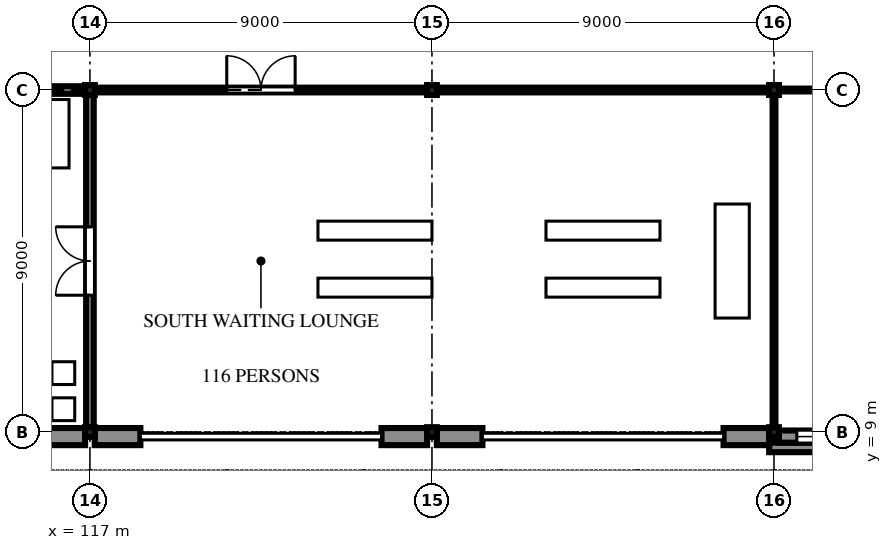
"""IFC4 building model, lengths in metres.
Left out: names, types, materials, properties, quantities, classifications, styles, units other than length and angle.
Written with IfcOpenShell. Run it as: python <this file> out.ifc"""

import sys

from ifc_helpers import new_model, si_unit, direction, frame, frame_2d, origin, origin_2d, place, context, subcontext, project, spatial, polyline, rectangle, i_section, outline, extrude, element, fill, save


model = new_model("IFC4")
c1 = context("Model", 3, precision=1e-05, world=origin(), true_north=direction((0.0, 1.0)))
c2 = subcontext(c1, "Body", "Model", "MODEL_VIEW")
j1 = project(units=[si_unit("LENGTHUNIT", "METRE"), si_unit("PLANEANGLEUNIT", "RADIAN")], contexts=[c1])
p1 = place(None, origin())
s1 = spatial("IfcSite", under=j1, at=p1, CompositionType="ELEMENT")
p2 = place(p1, origin())
s2 = spatial("IfcBuilding", under=s1, at=p2, CompositionType="ELEMENT")
p3 = place(p2, origin())
s3 = spatial("IfcBuildingStorey", under=s2, at=p3, CompositionType="ELEMENT", Elevation=0.0)
p4 = place(p3, frame((117.0, 9.0, -2.1), z_axis=(0.0, 0.0, 1.0), x_axis=(1.0, 0.0, 0.0)))
e1 = element("IfcColumn", 1, at=p4, inside=s3, PredefinedType="COLUMN", context=c2, shape_type="SweptSolid", body=[
    extrude(i_section(OverallWidth=0.255, OverallDepth=0.254, WebThickness=0.009, FlangeThickness=0.014, FilletRadius=0.013, at=origin_2d()), origin(), (0.0, 0.0, 1.0), 9.6),
])
p5 = place(p3, frame((117.0, 18.0, -2.1), z_axis=(0.0, 0.0, 1.0), x_axis=(1.0, 0.0, 0.0)))
e2 = element("IfcColumn", 2, at=p5, inside=s3, PredefinedType="COLUMN", context=c2, shape_type="SweptSolid", body=[
    extrude(i_section(OverallWidth=0.256, OverallDepth=0.26, WebThickness=0.01, FlangeThickness=0.017, FilletRadius=0.013, at=origin_2d()), origin(), (0.0, 0.0, 1.0), 9.6),
])
p6 = place(p3, frame((126.0, 9.0, -2.1), z_axis=(0.0, 0.0, 1.0), x_axis=(1.0, 0.0, 0.0)))
e3 = element("IfcColumn", 3, at=p6, inside=s3, PredefinedType="COLUMN", context=c2, shape_type="SweptSolid", body=[
    extrude(i_section(OverallWidth=0.255, OverallDepth=0.254, WebThickness=0.009, FlangeThickness=0.014, FilletRadius=0.013, at=origin_2d()), origin(), (0.0, 0.0, 1.0), 9.6),
])
p7 = place(p3, frame((126.0, 18.0, -2.1), z_axis=(0.0, 0.0, 1.0), x_axis=(1.0, 0.0, 0.0)))
e4 = element("IfcColumn", 4, at=p7, inside=s3, PredefinedType="COLUMN", context=c2, shape_type="SweptSolid", body=[
    extrude(i_section(OverallWidth=0.256, OverallDepth=0.26, WebThickness=0.01, FlangeThickness=0.017, FilletRadius=0.013, at=origin_2d()), origin(), (0.0, 0.0, 1.0), 9.6),
])
p8 = place(p3, frame((135.0, 9.0, -2.1), z_axis=(0.0, 0.0, 1.0), x_axis=(1.0, 0.0, 0.0)))
e5 = element("IfcColumn", 5, at=p8, inside=s3, PredefinedType="COLUMN", context=c2, shape_type="SweptSolid", body=[
    extrude(i_section(OverallWidth=0.255, OverallDepth=0.254, WebThickness=0.009, FlangeThickness=0.014, FilletRadius=0.013, at=origin_2d()), origin(), (0.0, 0.0, 1.0), 9.6),
])
p9 = place(p3, frame((135.0, 18.0, -2.1), z_axis=(0.0, 0.0, 1.0), x_axis=(1.0, 0.0, 0.0)))
e6 = element("IfcColumn", 6, at=p9, inside=s3, PredefinedType="COLUMN", context=c2, shape_type="SweptSolid", body=[
    extrude(i_section(OverallWidth=0.256, OverallDepth=0.26, WebThickness=0.01, FlangeThickness=0.017, FilletRadius=0.013, at=origin_2d()), origin(), (0.0, 0.0, 1.0), 9.6),
])
p10 = place(p3, frame((115.5, 8.88, 0.0), z_axis=(0.0, 0.0, 1.0), x_axis=(1.0, 0.0, 0.0)))
e7 = element("IfcWall", 7, at=p10, inside=s3, PredefinedType="SOLIDWALL", context=c2, shape_type="SweptSolid", body=[
    extrude(rectangle(XDim=1.373, YDim=0.45, at=frame_2d((0.687, 0.0))), origin(), (0.0, 0.0, 1.0), 6.767),
])
for number, where, z_axis, x_axis in (
    (8, (117.127, 8.88, 0.0), (0.0, 0.0, 1.0), (1.0, 0.0, 0.0)),
    (9, (124.673, 8.88, 0.0), (0.0, 0.0, 1.0), (1.0, 0.0, 0.0)),
    (10, (126.127, 8.88, 0.0), (0.0, 0.0, 1.0), (1.0, 0.0, 0.0)),
    (11, (133.673, 8.88, 0.0), (0.0, 0.0, 1.0), (1.0, 0.0, 0.0)),
):
    element("IfcWall", number, at=place(p3, frame(where, z_axis=z_axis, x_axis=x_axis)), inside=s3, PredefinedType="SOLIDWALL", context=c2, shape_type="SweptSolid", body=[
        extrude(rectangle(XDim=1.2, YDim=0.45, at=frame_2d((0.6, 0.0))), origin(), (0.0, 0.0, 1.0), 6.767),
    ])
p11 = place(p3, frame((135.127, 8.88, 0.0), z_axis=(0.0, 0.0, 1.0), x_axis=(1.0, 0.0, 0.0)))
e12 = element("IfcWall", 12, at=p11, inside=s3, PredefinedType="SOLIDWALL", context=c2, shape_type="SweptSolid", body=[
    extrude(rectangle(XDim=8.746, YDim=0.32, at=frame_2d((4.373, 0.0))), origin(), (0.0, 0.0, 1.0), 6.767),
])
p12 = place(p11, frame((3.473, 0.0, 0.0)))
e13 = element("IfcOpeningElement", 13, at=p12, cuts=e12, PredefinedType="OPENING", context=c2, shape_type="SweptSolid", body=[
    extrude(rectangle(XDim=1.8, YDim=2.1, at=frame_2d((0.9, 1.05))), frame((0.0, 0.17, 0.0), z_axis=(0.0, -1.0, 0.0), x_axis=(1.0, 0.0, 0.0)), (0.0, 0.0, 1.0), 0.34),
])
p13 = place(p11, frame((3.773, 0.0, 2.55)))
e14 = element("IfcOpeningElement", 14, at=p13, cuts=e12, PredefinedType="OPENING", context=c2, shape_type="SweptSolid", body=[
    extrude(rectangle(XDim=1.2, YDim=0.6, at=frame_2d((0.6, 0.3))), frame((0.0, 0.17, 0.0), z_axis=(0.0, -1.0, 0.0), x_axis=(1.0, 0.0, 0.0)), (0.0, 0.0, 1.0), 0.34),
])
p14 = place(p11, frame((0.473, 0.0, 0.9)))
e15 = element("IfcOpeningElement", 15, at=p14, cuts=e12, PredefinedType="OPENING", context=c2, shape_type="SweptSolid", body=[
    extrude(rectangle(XDim=1.8, YDim=3.6, at=frame_2d((0.9, 1.8))), frame((0.0, 0.17, 0.0), z_axis=(0.0, -1.0, 0.0), x_axis=(1.0, 0.0, 0.0)), (0.0, 0.0, 1.0), 0.34),
])
p15 = place(p11, frame((6.473, 0.0, 0.9)))
e16 = element("IfcOpeningElement", 16, at=p15, cuts=e12, PredefinedType="OPENING", context=c2, shape_type="SweptSolid", body=[
    extrude(rectangle(XDim=1.8, YDim=3.6, at=frame_2d((0.9, 1.8))), frame((0.0, 0.17, 0.0), z_axis=(0.0, -1.0, 0.0), x_axis=(1.0, 0.0, 0.0)), (0.0, 0.0, 1.0), 0.34),
])
p16 = place(p3, frame((134.873, 8.595, 0.0), z_axis=(0.0, 0.0, 1.0), x_axis=(1.0, 0.0, 0.0)))
e17 = element("IfcWall", 17, at=p16, inside=s3, PredefinedType="SOLIDWALL", context=c2, shape_type="SweptSolid", body=[
    extrude(outline(polyline([(0.0, 0.0), (3.577, 0.0), (3.577, 6.767), (0.0, 6.767), (0.0, 0.0)]), holes=[polyline([(0.577, 0.75), (0.577, 4.5), (0.619, 4.752), (0.787, 4.968), (0.934, 5.022), (1.06, 5.166), (1.333, 5.31), (1.627, 5.4), (1.921, 5.31), (2.194, 5.166), (2.32, 5.022), (2.467, 4.968), (2.635, 4.752), (2.677, 4.5), (2.677, 0.75), (0.577, 0.75)])]), frame((0.0, 0.125, 0.0), z_axis=(0.0, -1.0, 0.0), x_axis=(1.0, 0.0, 0.0)), (0.0, 0.0, 1.0), 0.25),
])
p17 = place(p3, frame((143.872, 18.0, 0.0), z_axis=(0.0, 0.0, 1.0), x_axis=(-1.0, 0.0, 0.0)))
e18 = element("IfcWall", 18, at=p17, inside=s3, PredefinedType="PARTITIONING", context=c2, shape_type="SweptSolid", body=[
    extrude(rectangle(XDim=8.744, YDim=0.075, at=frame_2d((4.372, 0.0))), origin(), (0.0, 0.0, 1.0), 6.692),
])
p18 = place(p17, frame((3.872, 0.0, 0.0)))
e19 = element("IfcOpeningElement", 19, at=p18, cuts=e18, PredefinedType="OPENING", context=c2, shape_type="SweptSolid", body=[
    extrude(rectangle(XDim=1.0, YDim=2.1, at=frame_2d((0.5, 1.05))), frame((0.0, 0.047, 0.0), z_axis=(0.0, -1.0, 0.0), x_axis=(1.0, 0.0, 0.0)), (0.0, 0.0, 1.0), 0.095),
])
p19 = place(p3, frame((134.872, 18.0, 0.0), z_axis=(0.0, 0.0, 1.0), x_axis=(-1.0, 0.0, 0.0)))
e20 = element("IfcWall", 20, at=p19, inside=s3, PredefinedType="PARTITIONING", context=c2, shape_type="SweptSolid", body=[
    extrude(rectangle(XDim=8.744, YDim=0.125, at=frame_2d((4.372, 0.0))), origin(), (0.0, 0.0, 1.0), 6.757),
])
p20 = place(p3, frame((125.872, 18.0, 0.0), z_axis=(0.0, 0.0, 1.0), x_axis=(-1.0, 0.0, 0.0)))
e21 = element("IfcWall", 21, at=p20, inside=s3, PredefinedType="PARTITIONING", context=c2, shape_type="SweptSolid", body=[
    extrude(rectangle(XDim=8.744, YDim=0.125, at=frame_2d((4.372, 0.0))), origin(), (0.0, 0.0, 1.0), 6.757),
])
p21 = place(p20, frame((3.472, 0.0, 0.0)))
e22 = element("IfcOpeningElement", 22, at=p21, cuts=e21, PredefinedType="OPENING", context=c2, shape_type="SweptSolid", body=[
    extrude(rectangle(XDim=1.8, YDim=2.4, at=frame_2d((0.9, 1.2))), frame((0.0, 0.073, 0.0), z_axis=(0.0, -1.0, 0.0), x_axis=(1.0, 0.0, 0.0)), (0.0, 0.0, 1.0), 0.145),
])
p22 = place(p3, frame((116.872, 18.0, 0.0), z_axis=(0.0, 0.0, 1.0), x_axis=(-1.0, 0.0, 0.0)))
e23 = element("IfcWall", 23, at=p22, inside=s3, PredefinedType="PARTITIONING", context=c2, shape_type="SweptSolid", body=[
    extrude(rectangle(XDim=8.744, YDim=0.2, at=frame_2d((4.372, 0.0))), origin(), (0.0, 0.0, 1.0), 6.6),
])
p23 = place(p22, frame((3.472, 0.0, 0.0)))
e24 = element("IfcOpeningElement", 24, at=p23, cuts=e23, PredefinedType="OPENING", context=c2, shape_type="SweptSolid", body=[
    extrude(rectangle(XDim=1.8, YDim=2.4, at=frame_2d((0.9, 1.2))), frame((0.0, 0.11, 0.0), z_axis=(0.0, -1.0, 0.0), x_axis=(1.0, 0.0, 0.0)), (0.0, 0.0, 1.0), 0.22),
])
p24 = place(p3, frame((117.0, 17.87, 0.0), z_axis=(0.0, 0.0, 1.0), x_axis=(0.0, -1.0, 0.0)))
e25 = element("IfcWall", 25, at=p24, inside=s3, PredefinedType="PARTITIONING", context=c2, shape_type="SweptSolid", body=[
    extrude(rectangle(XDim=8.743, YDim=0.2, at=frame_2d((4.372, 0.0))), origin(), (0.0, 0.0, 1.0), 6.6),
])
p25 = place(p24, frame((3.47, 0.0, 0.0)))
e26 = element("IfcOpeningElement", 26, at=p25, cuts=e25, PredefinedType="OPENING", context=c2, shape_type="SweptSolid", body=[
    extrude(rectangle(XDim=1.8, YDim=2.4, at=frame_2d((0.9, 1.2))), frame((0.0, 0.11, 0.0), z_axis=(0.0, -1.0, 0.0), x_axis=(1.0, 0.0, 0.0)), (0.0, 0.0, 1.0), 0.22),
])
p26 = place(p3, frame((135.0, 17.87, 0.0), z_axis=(0.0, 0.0, 1.0), x_axis=(0.0, -1.0, 0.0)))
e27 = element("IfcWall", 27, at=p26, inside=s3, PredefinedType="PARTITIONING", context=c2, shape_type="SweptSolid", body=[
    extrude(rectangle(XDim=8.743, YDim=0.075, at=frame_2d((4.372, 0.0))), origin(), (0.0, 0.0, 1.0), 6.692),
])
p27 = place(p14, origin())
e28 = element("IfcWindow", 28, at=p27, inside=s3, PartitioningType="TRIPLE_PANEL_HORIZONTAL", PredefinedType="WINDOW", context=c2, shape_type="SweptSolid", body=[
    extrude(outline(polyline([(0.0, 0.0), (1.8, 0.0), (1.8, 2.54), (1.793, 2.666), (1.771, 2.79), (1.734, 2.91), (1.684, 3.026), (1.62, 3.135), (1.545, 3.235), (1.458, 3.326), (1.361, 3.407), (1.255, 3.475), (1.142, 3.531), (1.023, 3.573), (0.9, 3.6), (0.777, 3.573), (0.658, 3.531), (0.545, 3.475), (0.439, 3.407), (0.342, 3.326), (0.255, 3.235), (0.18, 3.135), (0.116, 3.026), (0.066, 2.91), (0.03, 2.79), (0.007, 2.666), (0.0, 2.54), (0.0, 0.0)]), holes=[polyline([(0.07, 0.07), (1.73, 0.07), (1.73, 2.54), (1.723, 2.657), (1.703, 2.772), (1.669, 2.884), (1.623, 2.991), (1.565, 3.092), (1.495, 3.186), (1.415, 3.271), (1.325, 3.346), (1.228, 3.41), (1.124, 3.463), (1.014, 3.503), (0.9, 3.53), (0.786, 3.503), (0.677, 3.463), (0.572, 3.41), (0.475, 3.346), (0.385, 3.271), (0.305, 3.186), (0.235, 3.092), (0.177, 2.991), (0.131, 2.884), (0.097, 2.772), (0.077, 2.657), (0.07, 2.54), (0.07, 0.07)])]), frame((0.0, 0.03, 0.0), z_axis=(0.0, -1.0, 0.0), x_axis=(1.0, 0.0, 0.0)), (0.0, 0.0, 1.0), 0.06),
    extrude(outline(polyline([(0.0, 2.54), (0.007, 2.666), (0.03, 2.79), (0.066, 2.91), (0.116, 3.026), (0.18, 3.135), (0.255, 3.235), (0.342, 3.326), (0.439, 3.407), (0.545, 3.475), (0.658, 3.531), (0.777, 3.573), (0.9, 3.6), (0.0, 3.6), (0.0, 2.54)])), frame((0.0, 0.028, 0.0), z_axis=(0.0, -1.0, 0.0), x_axis=(1.0, 0.0, 0.0)), (0.0, 0.0, 1.0), 0.056),
    extrude(outline(polyline([(0.9, 3.6), (1.023, 3.573), (1.142, 3.531), (1.255, 3.475), (1.361, 3.407), (1.458, 3.326), (1.545, 3.235), (1.62, 3.135), (1.684, 3.026), (1.734, 2.91), (1.771, 2.79), (1.793, 2.666), (1.8, 2.54), (1.8, 3.6), (0.9, 3.6)])), frame((0.0, 0.027, 0.0), z_axis=(0.0, -1.0, 0.0), x_axis=(1.0, 0.0, 0.0)), (0.0, 0.0, 1.0), 0.054),
    extrude(outline(polyline([(1.728, 2.58), (0.073, 2.58), (0.07, 2.54), (0.07, 2.5), (1.73, 2.5), (1.73, 2.54), (1.728, 2.58)])), frame((0.0, 0.021, 0.0), z_axis=(0.0, -1.0, 0.0), x_axis=(1.0, 0.0, 0.0)), (0.0, 0.0, 1.0), 0.042),
    extrude(rectangle(XDim=1.66, YDim=0.04, at=frame_2d((0.9, 0.873))), frame((0.0, 0.021, 0.0), z_axis=(0.0, -1.0, 0.0), x_axis=(1.0, 0.0, 0.0)), (0.0, 0.0, 1.0), 0.043),
    extrude(rectangle(XDim=1.66, YDim=0.04, at=frame_2d((0.9, 1.697))), frame((0.0, 0.021, 0.0), z_axis=(0.0, -1.0, 0.0), x_axis=(1.0, 0.0, 0.0)), (0.0, 0.0, 1.0), 0.043),
    extrude(outline(polyline([(0.07, 0.07), (1.73, 0.07), (1.73, 0.853), (0.07, 0.853), (0.07, 0.07)]), holes=[polyline([(0.1, 0.1), (1.7, 0.1), (1.7, 0.823), (0.1, 0.823), (0.1, 0.1)])]), frame((0.0, 0.022, 0.0), z_axis=(0.0, -1.0, 0.0), x_axis=(1.0, 0.0, 0.0)), (0.0, 0.0, 1.0), 0.045),
    extrude(rectangle(XDim=1.6, YDim=0.723, at=frame_2d((0.9, 0.462))), frame((0.0, 0.006, 0.0), z_axis=(0.0, -1.0, 0.0), x_axis=(1.0, 0.0, 0.0)), (0.0, 0.0, 1.0), 0.012),
    extrude(outline(polyline([(0.07, 0.893), (1.73, 0.893), (1.73, 1.677), (0.07, 1.677), (0.07, 0.893)]), holes=[polyline([(0.1, 0.923), (1.7, 0.923), (1.7, 1.647), (0.1, 1.647), (0.1, 0.923)])]), frame((0.0, 0.022, 0.0), z_axis=(0.0, -1.0, 0.0), x_axis=(1.0, 0.0, 0.0)), (0.0, 0.0, 1.0), 0.045),
    extrude(rectangle(XDim=1.6, YDim=0.723, at=frame_2d((0.9, 1.285))), frame((0.0, 0.006, 0.0), z_axis=(0.0, -1.0, 0.0), x_axis=(1.0, 0.0, 0.0)), (0.0, 0.0, 1.0), 0.012),
    extrude(outline(polyline([(0.07, 1.717), (1.73, 1.717), (1.73, 2.5), (0.07, 2.5), (0.07, 1.717)]), holes=[polyline([(0.1, 1.747), (1.7, 1.747), (1.7, 2.47), (0.1, 2.47), (0.1, 1.747)])]), frame((0.0, 0.022, 0.0), z_axis=(0.0, -1.0, 0.0), x_axis=(1.0, 0.0, 0.0)), (0.0, 0.0, 1.0), 0.045),
    extrude(rectangle(XDim=1.6, YDim=0.723, at=frame_2d((0.9, 2.108))), frame((0.0, 0.006, 0.0), z_axis=(0.0, -1.0, 0.0), x_axis=(1.0, 0.0, 0.0)), (0.0, 0.0, 1.0), 0.012),
    extrude(outline(polyline([(0.073, 2.58), (1.728, 2.58), (1.723, 2.657), (1.703, 2.772), (1.669, 2.884), (1.623, 2.991), (1.565, 3.092), (1.495, 3.186), (1.415, 3.271), (1.325, 3.346), (1.228, 3.41), (1.124, 3.463), (1.014, 3.503), (0.9, 3.53), (0.786, 3.503), (0.677, 3.463), (0.572, 3.41), (0.475, 3.346), (0.385, 3.271), (0.305, 3.186), (0.235, 3.092), (0.177, 2.991), (0.131, 2.884), (0.097, 2.772), (0.077, 2.657), (0.073, 2.58)]), holes=[polyline([(0.112, 2.653), (0.131, 2.764), (0.164, 2.872), (0.208, 2.975), (0.265, 3.073), (0.332, 3.164), (0.409, 3.246), (0.496, 3.318), (0.59, 3.38), (0.69, 3.431), (0.796, 3.469), (0.9, 3.494), (1.004, 3.469), (1.11, 3.431), (1.21, 3.38), (1.304, 3.318), (1.391, 3.246), (1.468, 3.164), (1.535, 3.073), (1.592, 2.975), (1.636, 2.872), (1.669, 2.764), (1.688, 2.653), (1.69, 2.615), (0.11, 2.615), (0.112, 2.653)])]), frame((0.0, 0.022, 0.0), z_axis=(0.0, -1.0, 0.0), x_axis=(1.0, 0.0, 0.0)), (0.0, 0.0, 1.0), 0.045),
    extrude(outline(polyline([(0.11, 2.615), (1.69, 2.615), (1.688, 2.653), (1.669, 2.764), (1.636, 2.872), (1.592, 2.975), (1.535, 3.073), (1.468, 3.164), (1.391, 3.246), (1.304, 3.318), (1.21, 3.38), (1.11, 3.431), (1.004, 3.469), (0.9, 3.494), (0.796, 3.469), (0.69, 3.431), (0.59, 3.38), (0.496, 3.318), (0.409, 3.246), (0.332, 3.164), (0.265, 3.073), (0.208, 2.975), (0.164, 2.872), (0.131, 2.764), (0.112, 2.653), (0.11, 2.615)])), frame((0.0, 0.006, 0.0), z_axis=(0.0, -1.0, 0.0), x_axis=(1.0, 0.0, 0.0)), (0.0, 0.0, 1.0), 0.012),
])
fill(e15, e28)
p28 = place(p25, frame((1.8, 0.0, 0.0), z_axis=(0.0, 0.0, 1.0), x_axis=(-1.0, 0.0, 0.0)))
e29 = element("IfcDoor", 29, at=p28, inside=s3, OperationType="DOUBLE_DOOR_SINGLE_SWING", PredefinedType="DOOR", context=c2, shape_type="SweptSolid", body=[
    extrude(outline(polyline([(0.0, 0.0), (0.07, 0.0), (0.07, 2.33), (1.73, 2.33), (1.73, 0.0), (1.8, 0.0), (1.8, 2.4), (0.0, 2.4), (0.0, 0.0)])), frame((0.0, 0.025, 0.0), z_axis=(0.0, -1.0, 0.0), x_axis=(1.0, 0.0, 0.0)), (0.0, 0.0, 1.0), 0.05),
    extrude(outline(polyline([(0.074, 0.01), (0.897, 0.01), (0.897, 2.326), (0.074, 2.326), (0.074, 0.01)]), holes=[polyline([(0.194, 0.16), (0.777, 0.16), (0.777, 1.01), (0.194, 1.01), (0.194, 0.16)]), polyline([(0.335, 1.16), (0.635, 1.16), (0.635, 1.76), (0.335, 1.76), (0.335, 1.16)])]), frame((0.0, 0.017, 0.0), z_axis=(0.0, -1.0, 0.0), x_axis=(1.0, 0.0, 0.0)), (0.0, 0.0, 1.0), 0.035),
    extrude(rectangle(XDim=0.583, YDim=0.85, at=frame_2d((0.485, 0.585))), frame((0.0, 0.009, 0.0), z_axis=(0.0, -1.0, 0.0), x_axis=(1.0, 0.0, 0.0)), (0.0, 0.0, 1.0), 0.017),
    extrude(rectangle(XDim=0.3, YDim=0.6, at=frame_2d((0.485, 1.46))), frame((0.0, 0.006, 0.0), z_axis=(0.0, -1.0, 0.0), x_axis=(1.0, 0.0, 0.0)), (0.0, 0.0, 1.0), 0.012),
    extrude(outline(polyline([(0.903, 0.01), (1.726, 0.01), (1.726, 2.326), (0.903, 2.326), (0.903, 0.01)]), holes=[polyline([(1.023, 0.16), (1.606, 0.16), (1.606, 1.01), (1.023, 1.01), (1.023, 0.16)]), polyline([(1.165, 1.16), (1.465, 1.16), (1.465, 1.76), (1.165, 1.76), (1.165, 1.16)])]), frame((0.0, 0.017, 0.0), z_axis=(0.0, -1.0, 0.0), x_axis=(1.0, 0.0, 0.0)), (0.0, 0.0, 1.0), 0.035),
    extrude(rectangle(XDim=0.583, YDim=0.85, at=frame_2d((1.314, 0.585))), frame((0.0, 0.009, 0.0), z_axis=(0.0, -1.0, 0.0), x_axis=(1.0, 0.0, 0.0)), (0.0, 0.0, 1.0), 0.017),
    extrude(rectangle(XDim=0.3, YDim=0.6, at=frame_2d((1.314, 1.46))), frame((0.0, 0.006, 0.0), z_axis=(0.0, -1.0, 0.0), x_axis=(1.0, 0.0, 0.0)), (0.0, 0.0, 1.0), 0.012),
])
fill(e26, e29)
p29 = place(p21, frame((1.8, 0.0, 0.0), z_axis=(0.0, 0.0, 1.0), x_axis=(-1.0, 0.0, 0.0)))
e30 = element("IfcDoor", 30, at=p29, inside=s3, OperationType="DOUBLE_DOOR_SINGLE_SWING", PredefinedType="DOOR", context=c2, shape_type="SweptSolid", body=[
    extrude(outline(polyline([(0.0, 0.0), (0.07, 0.0), (0.07, 2.33), (1.73, 2.33), (1.73, 0.0), (1.8, 0.0), (1.8, 2.4), (0.0, 2.4), (0.0, 0.0)])), frame((0.0, 0.025, 0.0), z_axis=(0.0, -1.0, 0.0), x_axis=(1.0, 0.0, 0.0)), (0.0, 0.0, 1.0), 0.05),
    extrude(outline(polyline([(0.074, 0.01), (0.897, 0.01), (0.897, 2.326), (0.074, 2.326), (0.074, 0.01)]), holes=[polyline([(0.194, 0.16), (0.777, 0.16), (0.777, 1.01), (0.194, 1.01), (0.194, 0.16)]), polyline([(0.335, 1.16), (0.635, 1.16), (0.635, 1.76), (0.335, 1.76), (0.335, 1.16)])]), frame((0.0, 0.017, 0.0), z_axis=(0.0, -1.0, 0.0), x_axis=(1.0, 0.0, 0.0)), (0.0, 0.0, 1.0), 0.035),
    extrude(rectangle(XDim=0.583, YDim=0.85, at=frame_2d((0.485, 0.585))), frame((0.0, 0.009, 0.0), z_axis=(0.0, -1.0, 0.0), x_axis=(1.0, 0.0, 0.0)), (0.0, 0.0, 1.0), 0.017),
    extrude(rectangle(XDim=0.3, YDim=0.6, at=frame_2d((0.485, 1.46))), frame((0.0, 0.006, 0.0), z_axis=(0.0, -1.0, 0.0), x_axis=(1.0, 0.0, 0.0)), (0.0, 0.0, 1.0), 0.012),
    extrude(outline(polyline([(0.903, 0.01), (1.726, 0.01), (1.726, 2.326), (0.903, 2.326), (0.903, 0.01)]), holes=[polyline([(1.023, 0.16), (1.606, 0.16), (1.606, 1.01), (1.023, 1.01), (1.023, 0.16)]), polyline([(1.165, 1.16), (1.465, 1.16), (1.465, 1.76), (1.165, 1.76), (1.165, 1.16)])]), frame((0.0, 0.017, 0.0), z_axis=(0.0, -1.0, 0.0), x_axis=(1.0, 0.0, 0.0)), (0.0, 0.0, 1.0), 0.035),
    extrude(rectangle(XDim=0.583, YDim=0.85, at=frame_2d((1.314, 0.585))), frame((0.0, 0.009, 0.0), z_axis=(0.0, -1.0, 0.0), x_axis=(1.0, 0.0, 0.0)), (0.0, 0.0, 1.0), 0.017),
    extrude(rectangle(XDim=0.3, YDim=0.6, at=frame_2d((1.314, 1.46))), frame((0.0, 0.006, 0.0), z_axis=(0.0, -1.0, 0.0), x_axis=(1.0, 0.0, 0.0)), (0.0, 0.0, 1.0), 0.012),
])
fill(e22, e30)
save(model, sys.argv[1])
